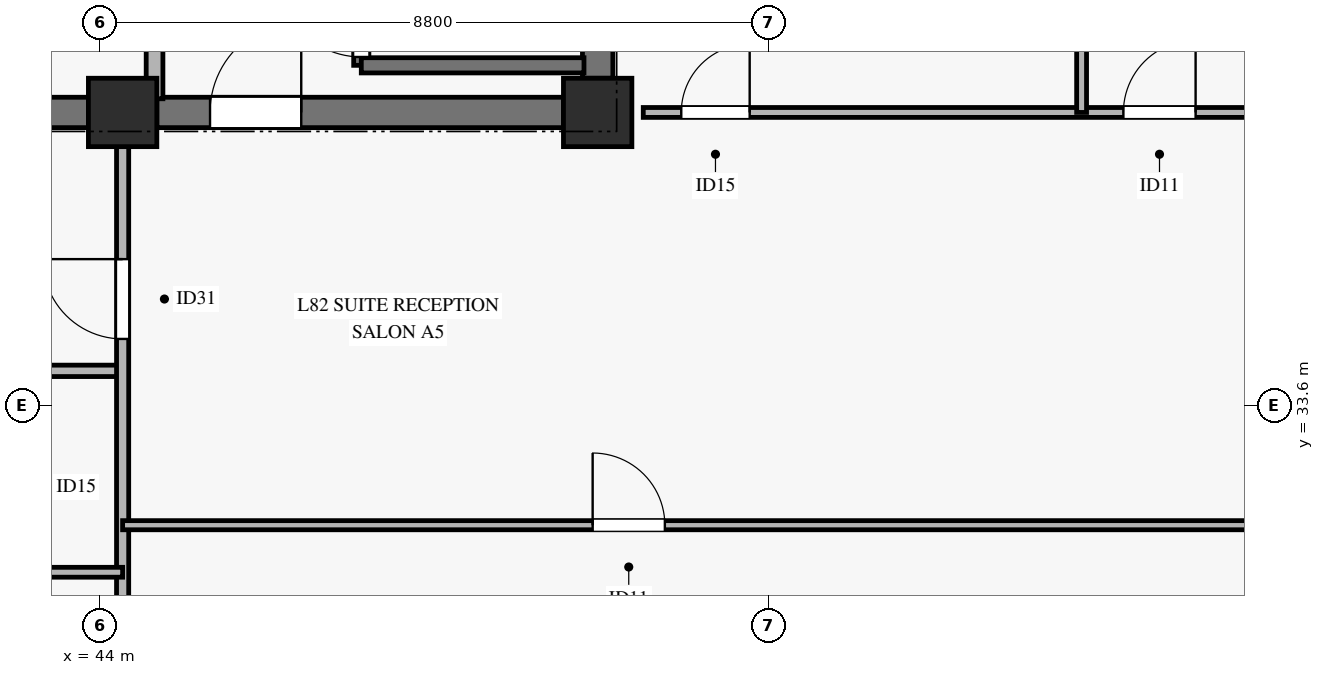
"""IFC4 building model, lengths in metres.
Left out: names, types, materials, properties, quantities, classifications, styles, units other than length and angle.
Written with IfcOpenShell. Run it as: python <this file> out.ifc"""

import sys

from ifc_helpers import new_model, si_unit, direction, frame, frame_2d, origin, origin_2d, place, context, subcontext, project, spatial, rectangle, extrude, source, transform, mapped, element, fill, save


model = new_model("IFC4")
c1 = context("Model", 3, precision=1e-05, world=origin(), true_north=direction((0.0, 1.0)))
c2 = subcontext(c1, "Body", "Model", "MODEL_VIEW")
j1 = project(units=[si_unit("LENGTHUNIT", "METRE"), si_unit("PLANEANGLEUNIT", "RADIAN")], contexts=[c1])
p1 = place(None, origin())
s1 = spatial("IfcSite", under=j1, at=p1, CompositionType="ELEMENT")
p2 = place(p1, origin())
s2 = spatial("IfcBuilding", under=s1, at=p2, CompositionType="ELEMENT")
p3 = place(p2, frame((0.0, 0.0, 317.6)))
s3 = spatial("IfcBuildingStorey", under=s2, at=p3, CompositionType="ELEMENT", Elevation=317.6)
m1 = source(origin(), c2, "Body", "SweptSolid", [
    extrude(rectangle(XDim=0.9, YDim=0.9, at=origin_2d()), origin(), (0.0, 0.0, 1.0), 3.185),
])
for number, where, z_axis, x_axis in (
    (1, (44.3, 37.45, 0.0), (0.0, 0.0, 1.0), (1.0, 0.0, 0.0)),
    (2, (50.55, 37.45, 0.0), (0.0, 0.0, 1.0), (1.0, 0.0, 0.0)),
):
    element("IfcColumn", number, at=place(p3, frame(where, z_axis=z_axis, x_axis=x_axis)), inside=s3, PredefinedType="PILASTER", context=c2, shape_type="MappedRepresentation", body=[
        mapped(m1, transform((0.0, 0.0, 0.0), x_axis=(1.0, 0.0, 0.0), y_axis=(0.0, 1.0, 0.0), z_axis=(0.0, 0.0, 1.0), scale=1.0)),
    ])
p4 = place(p3, frame((36.05, 37.45, 0.0), z_axis=(0.0, 0.0, 1.0), x_axis=(1.0, 0.0, 0.0)))
e3 = element("IfcWall", 3, at=p4, inside=s3, PredefinedType="SHEAR", context=c2, shape_type="SweptSolid", body=[
    extrude(rectangle(XDim=7.8, YDim=0.4, at=frame_2d((3.9, 0.0))), origin(), (0.0, 0.0, 1.0), 3.185),
])
p5 = place(p3, frame((44.75, 37.45, 0.0), z_axis=(0.0, 0.0, 1.0), x_axis=(1.0, 0.0, 0.0)))
e4 = element("IfcWall", 4, at=p5, inside=s3, PredefinedType="SHEAR", context=c2, shape_type="SweptSolid", body=[
    extrude(rectangle(XDim=5.35, YDim=0.4, at=frame_2d((2.675, 0.0))), origin(), (0.0, 0.0, 1.0), 3.185),
])
p6 = place(p5, frame((0.7, 0.0, 0.0)))
e5 = element("IfcOpeningElement", 5, at=p6, cuts=e4, PredefinedType="OPENING", context=c2, shape_type="SweptSolid", body=[
    extrude(rectangle(XDim=1.2, YDim=2.15, at=frame_2d((0.6, 1.075))), frame((0.0, 0.21, 0.0), z_axis=(0.0, -1.0, 0.0), x_axis=(1.0, 0.0, 0.0)), (0.0, 0.0, 1.0), 0.42),
])
p7 = place(p3, frame((50.55, 37.9, 0.0), z_axis=(0.0, 0.0, 1.0), x_axis=(0.0, 1.0, 0.0)))
e6 = element("IfcWall", 6, at=p7, inside=s3, PredefinedType="SHEAR", context=c2, shape_type="SweptSolid", body=[
    extrude(rectangle(XDim=8.2, YDim=0.4, at=frame_2d((4.1, 0.0))), origin(), (0.0, 0.0, 1.0), 3.185),
])
p8 = place(p3, frame((47.44, 38.07, 0.0), z_axis=(0.0, 0.0, 1.0), x_axis=(0.0, 1.0, 0.0)))
e7 = element("IfcWall", 7, at=p8, inside=s3, PredefinedType="SOLIDWALL", context=c2, shape_type="SweptSolid", body=[
    extrude(rectangle(XDim=7.25, YDim=0.2, at=frame_2d((3.625, 0.0))), origin(), (0.0, 0.0, 1.0), 3.4),
])
p9 = place(p8, frame((0.11, 0.0, 0.0)))
e8 = element("IfcOpeningElement", 8, at=p9, cuts=e7, PredefinedType="OPENING", context=c2, shape_type="SweptSolid", body=[
    extrude(rectangle(XDim=1.1, YDim=2.15, at=frame_2d((0.55, 1.075))), frame((0.0, 0.11, 0.0), z_axis=(0.0, -1.0, 0.0), x_axis=(1.0, 0.0, 0.0)), (0.0, 0.0, 1.0), 0.22),
])
p10 = place(p3, frame((47.44, 38.07, 0.0), z_axis=(0.0, 0.0, 1.0), x_axis=(1.0, 0.0, 0.0)))
e9 = element("IfcWall", 9, at=p10, inside=s3, PredefinedType="SOLIDWALL", context=c2, shape_type="SweptSolid", body=[
    extrude(rectangle(XDim=2.93, YDim=0.2, at=frame_2d((1.465, 0.0))), origin(), (0.0, 0.0, 1.0), 3.4),
])
p11 = place(p3, frame((44.72, 37.63, 0.0), z_axis=(0.0, 0.0, 1.0), x_axis=(0.0, 1.0, 0.0)))
e10 = element("IfcWall", 10, at=p11, inside=s3, PredefinedType="SOLIDWALL", context=c2, shape_type="SweptSolid", body=[
    extrude(rectangle(XDim=7.59, YDim=0.22, at=frame_2d((3.795, 0.0))), origin(), (0.0, 0.0, 1.0), 3.185),
])
p12 = place(p3, frame((23.4, 34.05, 0.0), z_axis=(0.0, 0.0, 1.0), x_axis=(1.0, 0.0, 0.0)))
e11 = element("IfcWall", 11, at=p12, inside=s3, PredefinedType="PARTITIONING", context=c2, shape_type="SweptSolid", body=[
    extrude(rectangle(XDim=20.9, YDim=0.15, at=frame_2d((10.45, 0.0))), origin(), (0.0, 0.0, 1.0), 2.47),
])
p13 = place(p12, frame((3.275, 0.0, 0.0)))
e12 = element("IfcOpeningElement", 12, at=p13, cuts=e11, PredefinedType="OPENING", context=c2, shape_type="SweptSolid", body=[
    extrude(rectangle(XDim=1.05, YDim=2.15, at=frame_2d((0.525, 1.075))), frame((0.0, 0.085, 0.0), z_axis=(0.0, -1.0, 0.0), x_axis=(1.0, 0.0, 0.0)), (0.0, 0.0, 1.0), 0.17),
])
p14 = place(p12, frame((10.775, 0.0, 0.0)))
e13 = element("IfcOpeningElement", 13, at=p14, cuts=e11, PredefinedType="OPENING", context=c2, shape_type="SweptSolid", body=[
    extrude(rectangle(XDim=1.05, YDim=2.15, at=frame_2d((0.525, 1.075))), frame((0.0, 0.085, 0.0), z_axis=(0.0, -1.0, 0.0), x_axis=(1.0, 0.0, 0.0)), (0.0, 0.0, 1.0), 0.17),
])
p15 = place(p12, frame((17.525, 0.0, 0.0)))
e14 = element("IfcOpeningElement", 14, at=p15, cuts=e11, PredefinedType="OPENING", context=c2, shape_type="SweptSolid", body=[
    extrude(rectangle(XDim=1.05, YDim=2.15, at=frame_2d((0.525, 1.075))), frame((0.0, 0.085, 0.0), z_axis=(0.0, -1.0, 0.0), x_axis=(1.0, 0.0, 0.0)), (0.0, 0.0, 1.0), 0.17),
])
p16 = place(p3, frame((44.3, 20.704, 0.0), z_axis=(0.0, 0.0, 1.0), x_axis=(0.0, 1.0, 0.0)))
e15 = element("IfcWall", 15, at=p16, inside=s3, PredefinedType="PARTITIONING", context=c2, shape_type="SweptSolid", body=[
    extrude(rectangle(XDim=16.746, YDim=0.16, at=frame_2d((8.373, 0.0))), origin(), (0.0, 0.0, 1.0), 2.47),
])
p17 = place(p16, frame((13.766, 0.0, 0.0)))
e16 = element("IfcOpeningElement", 16, at=p17, cuts=e15, PredefinedType="OPENING", context=c2, shape_type="SweptSolid", body=[
    extrude(rectangle(XDim=1.05, YDim=2.15, at=frame_2d((0.525, 1.075))), frame((0.0, 0.09, 0.0), z_axis=(0.0, -1.0, 0.0), x_axis=(1.0, 0.0, 0.0)), (0.0, 0.0, 1.0), 0.18),
])
p18 = place(p3, frame((42.72, 31.4, 0.0), z_axis=(0.0, 0.0, 1.0), x_axis=(1.0, 0.0, 0.0)))
e17 = element("IfcWall", 17, at=p18, inside=s3, PredefinedType="PARTITIONING", context=c2, shape_type="SweptSolid", body=[
    extrude(rectangle(XDim=1.58, YDim=0.13, at=frame_2d((0.79, 0.0))), origin(), (0.0, 0.0, 1.0), 2.47),
])
p19 = place(p3, frame((44.3, 32.019, 0.0), z_axis=(0.0, 0.0, 1.0), x_axis=(1.0, 0.0, 0.0)))
e18 = element("IfcWall", 18, at=p19, inside=s3, PredefinedType="PARTITIONING", context=c2, shape_type="SweptSolid", body=[
    extrude(rectangle(XDim=15.246, YDim=0.12, at=frame_2d((7.623, 0.0))), origin(), (0.0, 0.0, 1.0), 2.47),
])
p20 = place(p19, frame((6.184, 0.0, 0.0)))
e19 = element("IfcOpeningElement", 19, at=p20, cuts=e18, PredefinedType="OPENING", context=c2, shape_type="SweptSolid", body=[
    extrude(rectangle(XDim=0.95, YDim=2.1, at=frame_2d((0.475, 1.05))), frame((0.0, 0.07, 0.0), z_axis=(0.0, -1.0, 0.0), x_axis=(1.0, 0.0, 0.0)), (0.0, 0.0, 1.0), 0.14),
])
p21 = place(p3, frame((51.15, 37.45, 0.0), z_axis=(0.0, 0.0, 1.0), x_axis=(1.0, 0.0, 0.0)))
e20 = element("IfcWall", 20, at=p21, inside=s3, PredefinedType="PARTITIONING", context=c2, shape_type="SweptSolid", body=[
    extrude(rectangle(XDim=8.396, YDim=0.13, at=frame_2d((4.198, 0.0))), origin(), (0.0, 0.0, 1.0), 2.82),
])
p22 = place(p21, frame((0.5, 0.0, 0.0)))
e21 = element("IfcOpeningElement", 21, at=p22, cuts=e20, PredefinedType="OPENING", context=c2, shape_type="SweptSolid", body=[
    extrude(rectangle(XDim=0.9, YDim=2.1, at=frame_2d((0.45, 1.05))), frame((0.0, 0.075, 0.0), z_axis=(0.0, -1.0, 0.0), x_axis=(1.0, 0.0, 0.0)), (0.0, 0.0, 1.0), 0.15),
])
p23 = place(p21, frame((6.317, 0.0, 0.0)))
e22 = element("IfcOpeningElement", 22, at=p23, cuts=e20, PredefinedType="OPENING", context=c2, shape_type="SweptSolid", body=[
    extrude(rectangle(XDim=0.95, YDim=2.1, at=frame_2d((0.475, 1.05))), frame((0.0, 0.075, 0.0), z_axis=(0.0, -1.0, 0.0), x_axis=(1.0, 0.0, 0.0)), (0.0, 0.0, 1.0), 0.15),
])
p24 = place(p3, frame((56.917, 37.45, 0.0), z_axis=(0.0, 0.0, 1.0), x_axis=(0.0, 1.0, 0.0)))
e23 = element("IfcWall", 23, at=p24, inside=s3, PredefinedType="PARTITIONING", context=c2, shape_type="SweptSolid", body=[
    extrude(rectangle(XDim=8.8, YDim=0.13, at=frame_2d((4.4, 0.0))), origin(), (0.0, 0.0, 1.0), 2.82),
])
m2 = source(origin(), c2, "Body", "SweptSolid", [
    extrude(rectangle(XDim=1.1, YDim=2.15, at=frame_2d((0.55, 1.075))), frame((0.0, 0.025, 0.0), z_axis=(0.0, -1.0, 0.0), x_axis=(1.0, 0.0, 0.0)), (0.0, 0.0, 1.0), 0.05),
])
p25 = place(p9, origin())
e24 = element("IfcDoor", 24, at=p25, inside=s3, OperationType="SINGLE_SWING_RIGHT", PredefinedType="DOOR", context=c2, shape_type="MappedRepresentation", body=[
    mapped(m2, transform((0.0, 0.0, 0.0), x_axis=(1.0, 0.0, 0.0), y_axis=(0.0, 1.0, 0.0), z_axis=(0.0, 0.0, 1.0), scale=1.0)),
])
fill(e8, e24)
m3 = source(origin(), c2, "Body", "SweptSolid", [
    extrude(rectangle(XDim=1.2, YDim=2.15, at=frame_2d((0.6, 1.075))), frame((0.0, 0.025, 0.0), z_axis=(0.0, -1.0, 0.0), x_axis=(1.0, 0.0, 0.0)), (0.0, 0.0, 1.0), 0.05),
])
p26 = place(p6, origin())
e25 = element("IfcDoor", 25, at=p26, inside=s3, OperationType="SINGLE_SWING_RIGHT", PredefinedType="DOOR", context=c2, shape_type="MappedRepresentation", body=[
    mapped(m3, transform((0.0, 0.0, 0.0), x_axis=(1.0, 0.0, 0.0), y_axis=(0.0, 1.0, 0.0), z_axis=(0.0, 0.0, 1.0), scale=1.0)),
])
fill(e5, e25)
m4 = source(origin(), c2, "Body", "SweptSolid", [
    extrude(rectangle(XDim=1.05, YDim=2.15, at=frame_2d((0.525, 1.075))), frame((0.0, 0.025, 0.0), z_axis=(0.0, -1.0, 0.0), x_axis=(1.0, 0.0, 0.0)), (0.0, 0.0, 1.0), 0.05),
])
p27 = place(p17, origin())
e26 = element("IfcDoor", 26, at=p27, inside=s3, OperationType="SINGLE_SWING_RIGHT", PredefinedType="DOOR", context=c2, shape_type="MappedRepresentation", body=[
    mapped(m4, transform((0.0, 0.0, 0.0), x_axis=(1.0, 0.0, 0.0), y_axis=(0.0, 1.0, 0.0), z_axis=(0.0, 0.0, 1.0), scale=1.0)),
])
fill(e16, e26)
m5 = source(origin(), c2, "Body", "SweptSolid", [
    extrude(rectangle(XDim=0.95, YDim=2.1, at=frame_2d((0.475, 1.05))), frame((0.0, 0.025, 0.0), z_axis=(0.0, -1.0, 0.0), x_axis=(1.0, 0.0, 0.0)), (0.0, 0.0, 1.0), 0.05),
])
p28 = place(p20, origin())
e27 = element("IfcDoor", 27, at=p28, inside=s3, OperationType="SINGLE_SWING_LEFT", PredefinedType="DOOR", context=c2, shape_type="MappedRepresentation", body=[
    mapped(m5, transform((0.0, 0.0, 0.0), x_axis=(1.0, 0.0, 0.0), y_axis=(0.0, 1.0, 0.0), z_axis=(0.0, 0.0, 1.0), scale=1.0)),
])
fill(e19, e27)
m6 = source(origin(), c2, "Body", "SweptSolid", [
    extrude(rectangle(XDim=0.9, YDim=2.1, at=frame_2d((0.45, 1.05))), frame((0.0, 0.025, 0.0), z_axis=(0.0, -1.0, 0.0), x_axis=(1.0, 0.0, 0.0)), (0.0, 0.0, 1.0), 0.05),
])
p29 = place(p22, origin())
e28 = element("IfcDoor", 28, at=p29, inside=s3, OperationType="SINGLE_SWING_RIGHT", PredefinedType="DOOR", context=c2, shape_type="MappedRepresentation", body=[
    mapped(m6, transform((0.0, 0.0, 0.0), x_axis=(1.0, 0.0, 0.0), y_axis=(0.0, 1.0, 0.0), z_axis=(0.0, 0.0, 1.0), scale=1.0)),
])
fill(e21, e28)
p30 = place(p23, origin())
e29 = element("IfcDoor", 29, at=p30, inside=s3, OperationType="SINGLE_SWING_RIGHT", PredefinedType="DOOR", context=c2, shape_type="MappedRepresentation", body=[
    mapped(m5, transform((0.0, 0.0, 0.0), x_axis=(1.0, 0.0, 0.0), y_axis=(0.0, 1.0, 0.0), z_axis=(0.0, 0.0, 1.0), scale=1.0)),
])
fill(e22, e29)
save(model, sys.argv[1])
